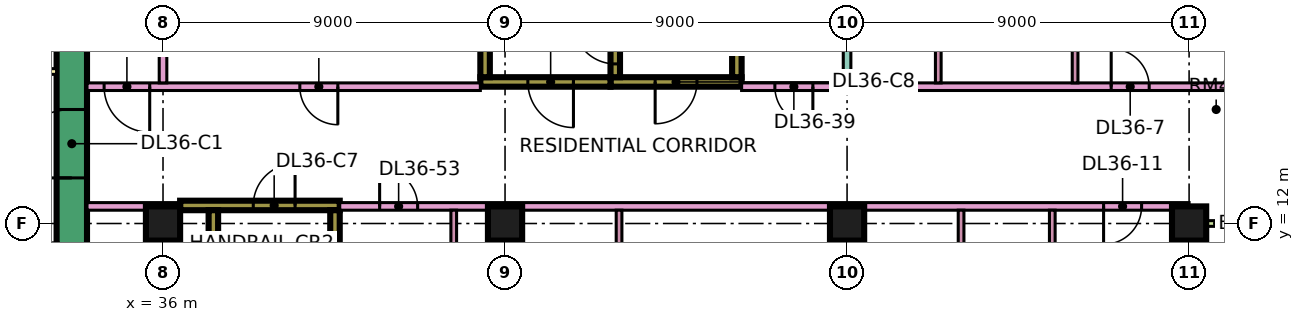
"""IFC4 building model, lengths in metres.
Left out: names, types, materials, properties, quantities, classifications, styles, units other than length and angle.
Written with IfcOpenShell. Run it as: python <this file> out.ifc"""

import sys

from ifc_helpers import new_model, si_unit, direction, frame, frame_2d, origin, origin_2d, place, context, subcontext, project, spatial, rectangle, extrude, element, fill, save


model = new_model("IFC4")
c1 = context("Model", 3, precision=1e-05, world=origin(), true_north=direction((0.0, 1.0)))
c2 = subcontext(c1, "Body", "Model", "MODEL_VIEW")
j1 = project(units=[si_unit("LENGTHUNIT", "METRE"), si_unit("PLANEANGLEUNIT", "RADIAN")], contexts=[c1])
p1 = place(None, origin())
s1 = spatial("IfcSite", under=j1, at=p1, CompositionType="ELEMENT")
p2 = place(p1, origin())
s2 = spatial("IfcBuilding", under=s1, at=p2, CompositionType="ELEMENT")
p3 = place(p2, frame((0.0, 0.0, 161.15)))
s3 = spatial("IfcBuildingStorey", under=s2, at=p3, CompositionType="ELEMENT", Elevation=161.15)
for number, where, z_axis, x_axis in (
    (1, (36.0, 12.0, 0.0), (0.0, 0.0, 1.0), (1.0, 0.0, 0.0)),
    (2, (45.0, 12.0, 0.0), (0.0, 0.0, 1.0), (1.0, 0.0, 0.0)),
    (3, (54.0, 12.0, 0.0), (0.0, 0.0, 1.0), (1.0, 0.0, 0.0)),
    (4, (63.0, 12.0, 0.0), (0.0, 0.0, 1.0), (1.0, 0.0, 0.0)),
):
    element("IfcColumn", number, at=place(p3, frame(where, z_axis=z_axis, x_axis=x_axis)), inside=s3, PredefinedType="COLUMN", context=c2, shape_type="SweptSolid", body=[
        extrude(rectangle(XDim=0.9, YDim=0.9, at=origin_2d()), origin(), (0.0, 0.0, 1.0), 3.75),
    ])
p4 = place(p3, frame((33.6, 7.8, 0.0), z_axis=(0.0, 0.0, 1.0), x_axis=(0.0, 1.0, 0.0)))
e5 = element("IfcWall", 5, at=p4, inside=s3, PredefinedType="SHEAR", context=c2, shape_type="SweptSolid", body=[
    extrude(rectangle(XDim=11.4, YDim=0.8, at=frame_2d((5.7, 0.0))), origin(), (0.0, 0.0, 1.0), 3.75),
])
p5 = place(p4, frame((5.4, 0.0, 0.0)))
e6 = element("IfcOpeningElement", 6, at=p5, cuts=e5, PredefinedType="OPENING", context=c2, shape_type="SweptSolid", body=[
    extrude(rectangle(XDim=1.8, YDim=2.4, at=frame_2d((0.9, 1.2))), frame((0.0, 0.41, 0.0), z_axis=(0.0, -1.0, 0.0), x_axis=(1.0, 0.0, 0.0)), (0.0, 0.0, 1.0), 0.82),
])
p6 = place(p3, frame((36.45, 12.475, 0.0), z_axis=(0.0, 0.0, 1.0), x_axis=(1.0, 0.0, 0.0)))
e7 = element("IfcWall", 7, at=p6, inside=s3, PredefinedType="SHEAR", context=c2, shape_type="SweptSolid", body=[
    extrude(rectangle(XDim=4.2, YDim=0.25, at=frame_2d((2.1, 0.0))), origin(), (0.0, 0.0, 1.0), 3.75),
])
p7 = place(p6, frame((1.925, 0.0, 0.0)))
e8 = element("IfcOpeningElement", 8, at=p7, cuts=e7, PredefinedType="OPENING", context=c2, shape_type="SweptSolid", body=[
    extrude(rectangle(XDim=1.1, YDim=2.2, at=frame_2d((0.55, 1.1))), frame((0.0, 0.135, 0.0), z_axis=(0.0, -1.0, 0.0), x_axis=(1.0, 0.0, 0.0)), (0.0, 0.0, 1.0), 0.27),
])
for number, where, z_axis, x_axis in (
    (9, (37.325, 5.85, 0.0), (0.0, 0.0, 1.0), (0.0, 1.0, 0.0)),
    (10, (40.525, 5.85, 0.0), (0.0, 0.0, 1.0), (0.0, 1.0, 0.0)),
):
    element("IfcWall", number, at=place(p3, frame(where, z_axis=z_axis, x_axis=x_axis)), inside=s3, PredefinedType="SHEAR", context=c2, shape_type="SweptSolid", body=[
        extrude(rectangle(XDim=6.5, YDim=0.25, at=frame_2d((3.25, 0.0))), origin(), (0.0, 0.0, 1.0), 3.75),
    ])
p8 = place(p3, frame((47.775, 15.725, 0.0), z_axis=(0.0, 0.0, 1.0), x_axis=(1.0, 0.0, 0.0)))
e11 = element("IfcWall", 11, at=p8, inside=s3, PredefinedType="SHEAR", context=c2, shape_type="SweptSolid", body=[
    extrude(rectangle(XDim=3.45, YDim=0.25, at=frame_2d((1.725, 0.0))), origin(), (0.0, 0.0, 1.0), 3.75),
])
p9 = place(p8, frame((1.175, 0.0, 0.0)))
e12 = element("IfcOpeningElement", 12, at=p9, cuts=e11, PredefinedType="OPENING", context=c2, shape_type="SweptSolid", body=[
    extrude(rectangle(XDim=1.1, YDim=2.2, at=frame_2d((0.55, 1.1))), frame((0.0, 0.135, 0.0), z_axis=(0.0, -1.0, 0.0), x_axis=(1.0, 0.0, 0.0)), (0.0, 0.0, 1.0), 0.27),
])
p10 = place(p3, frame((47.9, 15.85, 0.0), z_axis=(0.0, 0.0, 1.0), x_axis=(0.0, 1.0, 0.0)))
e13 = element("IfcWall", 13, at=p10, inside=s3, PredefinedType="SHEAR", context=c2, shape_type="SweptSolid", body=[
    extrude(rectangle(XDim=6.5, YDim=0.25, at=frame_2d((3.25, 0.0))), origin(), (0.0, 0.0, 1.0), 3.75),
])
p11 = place(p10, frame((0.35, 0.0, 0.0)))
e14 = element("IfcOpeningElement", 14, at=p11, cuts=e13, PredefinedType="OPENING", context=c2, shape_type="SweptSolid", body=[
    extrude(rectangle(XDim=1.1, YDim=2.2, at=frame_2d((0.55, 1.1))), frame((0.0, 0.135, 0.0), z_axis=(0.0, -1.0, 0.0), x_axis=(1.0, 0.0, 0.0)), (0.0, 0.0, 1.0), 0.27),
])
p12 = place(p3, frame((51.1, 15.85, 0.0), z_axis=(0.0, 0.0, 1.0), x_axis=(0.0, 1.0, 0.0)))
e15 = element("IfcWall", 15, at=p12, inside=s3, PredefinedType="SHEAR", context=c2, shape_type="SweptSolid", body=[
    extrude(rectangle(XDim=6.5, YDim=0.25, at=frame_2d((3.25, 0.0))), origin(), (0.0, 0.0, 1.0), 3.75),
])
p13 = place(p3, frame((44.35, 15.725, 0.0), z_axis=(0.0, 0.0, 1.0), x_axis=(1.0, 0.0, 0.0)))
e16 = element("IfcWall", 16, at=p13, inside=s3, PredefinedType="SHEAR", context=c2, shape_type="SweptSolid", body=[
    extrude(rectangle(XDim=3.425, YDim=0.25, at=frame_2d((1.712, 0.0))), origin(), (0.0, 0.0, 1.0), 3.75),
])
p14 = place(p13, frame((1.25, 0.0, 0.0)))
e17 = element("IfcOpeningElement", 17, at=p14, cuts=e16, PredefinedType="OPENING", context=c2, shape_type="SweptSolid", body=[
    extrude(rectangle(XDim=1.2, YDim=2.2, at=frame_2d((0.6, 1.1))), frame((0.0, 0.135, 0.0), z_axis=(0.0, -1.0, 0.0), x_axis=(1.0, 0.0, 0.0)), (0.0, 0.0, 1.0), 0.27),
])
p15 = place(p3, frame((44.475, 15.85, 0.0), z_axis=(0.0, 0.0, 1.0), x_axis=(0.0, 1.0, 0.0)))
e18 = element("IfcWall", 18, at=p15, inside=s3, PredefinedType="SHEAR", context=c2, shape_type="SweptSolid", body=[
    extrude(rectangle(XDim=6.5, YDim=0.25, at=frame_2d((3.25, 0.0))), origin(), (0.0, 0.0, 1.0), 3.75),
])
p16 = place(p15, frame((1.75, 0.0, 0.0)))
e19 = element("IfcOpeningElement", 19, at=p16, cuts=e18, PredefinedType="OPENING", context=c2, shape_type="SweptSolid", body=[
    extrude(rectangle(XDim=1.1, YDim=2.2, at=frame_2d((0.55, 1.1))), frame((0.0, 0.135, 0.0), z_axis=(0.0, -1.0, 0.0), x_axis=(1.0, 0.0, 0.0)), (0.0, 0.0, 1.0), 0.27),
])
p17 = place(p15, frame((4.3, 0.0, 0.0)))
e20 = element("IfcOpeningElement", 20, at=p17, cuts=e18, PredefinedType="OPENING", context=c2, shape_type="SweptSolid", body=[
    extrude(rectangle(XDim=1.1, YDim=2.2, at=frame_2d((0.55, 1.1))), frame((0.0, 0.135, 0.0), z_axis=(0.0, -1.0, 0.0), x_axis=(1.0, 0.0, 0.0)), (0.0, 0.0, 1.0), 0.27),
])
p18 = place(p3, frame((63.0, 1.575, 0.0), z_axis=(0.0, 0.0, 1.0), x_axis=(0.0, 1.0, 0.0)))
e21 = element("IfcWall", 21, at=p18, inside=s3, PredefinedType="SOLIDWALL", context=c2, shape_type="SweptSolid", body=[
    extrude(rectangle(XDim=10.35, YDim=0.15, at=frame_2d((5.175, 0.0))), origin(), (0.0, 0.0, 1.0), 3.35),
])
p19 = place(p18, frame((4.038, 0.0, 0.0)))
e22 = element("IfcOpeningElement", 22, at=p19, cuts=e21, PredefinedType="OPENING", context=c2, shape_type="SweptSolid", body=[
    extrude(rectangle(XDim=1.8, YDim=2.4, at=frame_2d((0.9, 1.2))), frame((0.0, 0.085, 0.0), z_axis=(0.0, -1.0, 0.0), x_axis=(1.0, 0.0, 0.0)), (0.0, 0.0, 1.0), 0.17),
])
p20 = place(p3, frame((64.5, 12.0, 0.0), z_axis=(0.0, 0.0, 1.0), x_axis=(-1.0, 0.0, 0.0)))
e23 = element("IfcWall", 23, at=p20, inside=s3, PredefinedType="SOLIDWALL", context=c2, shape_type="SweptSolid", body=[
    extrude(rectangle(XDim=1.5, YDim=0.15, at=frame_2d((0.75, 0.0))), origin(), (0.0, 0.0, 1.0), 3.35),
])
p21 = place(p3, frame((31.2, 16.0, 0.0), z_axis=(0.0, 0.0, 1.0), x_axis=(1.0, 0.0, 0.0)))
e24 = element("IfcWall", 24, at=p21, inside=s3, PredefinedType="PARTITIONING", context=c2, shape_type="SweptSolid", body=[
    extrude(rectangle(XDim=2.0, YDim=0.15, at=frame_2d((1.0, 0.0))), origin(), (0.0, 0.0, 1.0), 3.35),
])
p22 = place(p3, frame((34.0, 12.45, 0.0), z_axis=(0.0, 0.0, 1.0), x_axis=(1.0, 0.0, 0.0)))
e25 = element("IfcWall", 25, at=p22, inside=s3, PredefinedType="PARTITIONING", context=c2, shape_type="SweptSolid", body=[
    extrude(rectangle(XDim=2.451, YDim=0.2, at=frame_2d((1.226, 0.0))), origin(), (0.0, 0.0, 1.0), 3.35),
])
p23 = place(p3, frame((34.0, 15.6, 0.0), z_axis=(0.0, 0.0, 1.0), x_axis=(1.0, 0.0, 0.0)))
e26 = element("IfcWall", 26, at=p23, inside=s3, PredefinedType="PARTITIONING", context=c2, shape_type="SweptSolid", body=[
    extrude(rectangle(XDim=10.35, YDim=0.2, at=frame_2d((5.175, 0.0))), origin(), (0.0, 0.0, 1.0), 3.35),
])
p24 = place(p23, frame((5.6, 0.0, 0.0)))
e27 = element("IfcOpeningElement", 27, at=p24, cuts=e26, PredefinedType="OPENING", context=c2, shape_type="SweptSolid", body=[
    extrude(rectangle(XDim=1.0, YDim=2.1, at=frame_2d((0.5, 1.05))), frame((0.0, 0.11, 0.0), z_axis=(0.0, -1.0, 0.0), x_axis=(1.0, 0.0, 0.0)), (0.0, 0.0, 1.0), 0.22),
])
p25 = place(p23, frame((0.45, 0.0, 0.0)))
e28 = element("IfcOpeningElement", 28, at=p25, cuts=e26, PredefinedType="OPENING", context=c2, shape_type="SweptSolid", body=[
    extrude(rectangle(XDim=1.2, YDim=2.1, at=frame_2d((0.6, 1.05))), frame((0.0, 0.11, 0.0), z_axis=(0.0, -1.0, 0.0), x_axis=(1.0, 0.0, 0.0)), (0.0, 0.0, 1.0), 0.22),
])
p26 = place(p3, frame((36.0, 15.7, 0.0), z_axis=(0.0, 0.0, 1.0), x_axis=(0.0, 1.0, 0.0)))
e29 = element("IfcWall", 29, at=p26, inside=s3, PredefinedType="PARTITIONING", context=c2, shape_type="SweptSolid", body=[
    extrude(rectangle(XDim=8.3, YDim=0.2, at=frame_2d((4.15, 0.0))), origin(), (0.0, 0.0, 1.0), 3.35),
])
p27 = place(p3, frame((40.65, 12.45, 0.0), z_axis=(0.0, 0.0, 1.0), x_axis=(1.0, 0.0, 0.0)))
e30 = element("IfcWall", 30, at=p27, inside=s3, PredefinedType="PARTITIONING", context=c2, shape_type="SweptSolid", body=[
    extrude(rectangle(XDim=22.35, YDim=0.2, at=frame_2d((11.175, 0.0))), origin(), (0.0, 0.0, 1.0), 3.35),
])
p28 = place(p27, frame((20.1, 0.0, 0.0)))
e31 = element("IfcOpeningElement", 31, at=p28, cuts=e30, PredefinedType="OPENING", context=c2, shape_type="SweptSolid", body=[
    extrude(rectangle(XDim=1.0, YDim=2.1, at=frame_2d((0.5, 1.05))), frame((0.0, 0.11, 0.0), z_axis=(0.0, -1.0, 0.0), x_axis=(1.0, 0.0, 0.0)), (0.0, 0.0, 1.0), 0.22),
])
p29 = place(p27, frame((1.05, 0.0, 0.0)))
e32 = element("IfcOpeningElement", 32, at=p29, cuts=e30, PredefinedType="OPENING", context=c2, shape_type="SweptSolid", body=[
    extrude(rectangle(XDim=1.0, YDim=2.1, at=frame_2d((0.5, 1.05))), frame((0.0, 0.11, 0.0), z_axis=(0.0, -1.0, 0.0), x_axis=(1.0, 0.0, 0.0)), (0.0, 0.0, 1.0), 0.22),
])
p30 = place(p3, frame((43.65, 5.975, 0.0), z_axis=(0.0, 0.0, 1.0), x_axis=(0.0, 1.0, 0.0)))
e33 = element("IfcWall", 33, at=p30, inside=s3, PredefinedType="PARTITIONING", context=c2, shape_type="SweptSolid", body=[
    extrude(rectangle(XDim=6.375, YDim=0.15, at=frame_2d((3.188, 0.0))), origin(), (0.0, 0.0, 1.0), 3.35),
])
p31 = place(p30, frame((4.275, 0.0, 0.0)))
e34 = element("IfcOpeningElement", 34, at=p31, cuts=e33, PredefinedType="OPENING", context=c2, shape_type="SweptSolid", body=[
    extrude(rectangle(XDim=0.9, YDim=2.1, at=frame_2d((0.45, 1.05))), frame((0.0, 0.085, 0.0), z_axis=(0.0, -1.0, 0.0), x_axis=(1.0, 0.0, 0.0)), (0.0, 0.0, 1.0), 0.17),
])
p32 = place(p3, frame((48.0, 5.975, 0.0), z_axis=(0.0, 0.0, 1.0), x_axis=(0.0, 1.0, 0.0)))
e35 = element("IfcWall", 35, at=p32, inside=s3, PredefinedType="PARTITIONING", context=c2, shape_type="SweptSolid", body=[
    extrude(rectangle(XDim=6.375, YDim=0.15, at=frame_2d((3.188, 0.0))), origin(), (0.0, 0.0, 1.0), 3.35),
])
p33 = place(p3, frame((51.225, 15.6, 0.0), z_axis=(0.0, 0.0, 1.0), x_axis=(1.0, 0.0, 0.0)))
e36 = element("IfcWall", 36, at=p33, inside=s3, PredefinedType="PARTITIONING", context=c2, shape_type="SweptSolid", body=[
    extrude(rectangle(XDim=13.125, YDim=0.2, at=frame_2d((6.562, 0.0))), origin(), (0.0, 0.0, 1.0), 3.35),
])
p34 = place(p33, frame((9.725, 0.0, 0.0)))
e37 = element("IfcOpeningElement", 37, at=p34, cuts=e36, PredefinedType="OPENING", context=c2, shape_type="SweptSolid", body=[
    extrude(rectangle(XDim=1.0, YDim=2.1, at=frame_2d((0.5, 1.05))), frame((0.0, 0.11, 0.0), z_axis=(0.0, -1.0, 0.0), x_axis=(1.0, 0.0, 0.0)), (0.0, 0.0, 1.0), 0.22),
])
p35 = place(p33, frame((0.875, 0.0, 0.0)))
e38 = element("IfcOpeningElement", 38, at=p35, cuts=e36, PredefinedType="OPENING", context=c2, shape_type="SweptSolid", body=[
    extrude(rectangle(XDim=1.0, YDim=2.1, at=frame_2d((0.5, 1.05))), frame((0.0, 0.11, 0.0), z_axis=(0.0, -1.0, 0.0), x_axis=(1.0, 0.0, 0.0)), (0.0, 0.0, 1.0), 0.22),
])
p36 = place(p3, frame((54.0, 0.074, 0.0), z_axis=(0.0, 0.0, 1.0), x_axis=(0.0, 1.0, 0.0)))
e39 = element("IfcWall", 39, at=p36, inside=s3, PredefinedType="PARTITIONING", context=c2, shape_type="SweptSolid", body=[
    extrude(rectangle(XDim=12.276, YDim=0.2, at=frame_2d((6.138, 0.0))), origin(), (0.0, 0.0, 1.0), 3.35),
])
p37 = place(p3, frame((54.0, 15.7, 0.0), z_axis=(0.0, 0.0, 1.0), x_axis=(0.0, 1.0, 0.0)))
e40 = element("IfcWall", 40, at=p37, inside=s3, PredefinedType="PARTITIONING", context=c2, shape_type="SweptSolid", body=[
    extrude(rectangle(XDim=8.226, YDim=0.2, at=frame_2d((4.113, 0.0))), origin(), (0.0, 0.0, 1.0), 3.35),
])
p38 = place(p3, frame((56.4, 15.7, 0.0), z_axis=(0.0, 0.0, 1.0), x_axis=(0.0, 1.0, 0.0)))
e41 = element("IfcWall", 41, at=p38, inside=s3, PredefinedType="PARTITIONING", context=c2, shape_type="SweptSolid", body=[
    extrude(rectangle(XDim=2.825, YDim=0.15, at=frame_2d((1.413, 0.0))), origin(), (0.0, 0.0, 1.0), 3.35),
])
for number, where, z_axis, x_axis in (
    (42, (57.0, 7.725, 0.0), (0.0, 0.0, 1.0), (0.0, 1.0, 0.0)),
    (43, (59.4, 7.725, 0.0), (0.0, 0.0, 1.0), (0.0, 1.0, 0.0)),
):
    element("IfcWall", number, at=place(p3, frame(where, z_axis=z_axis, x_axis=x_axis)), inside=s3, PredefinedType="PARTITIONING", context=c2, shape_type="SweptSolid", body=[
        extrude(rectangle(XDim=4.625, YDim=0.15, at=frame_2d((2.312, 0.0))), origin(), (0.0, 0.0, 1.0), 3.35),
    ])
p39 = place(p3, frame((60.0, 15.7, 0.0), z_axis=(0.0, 0.0, 1.0), x_axis=(0.0, 1.0, 0.0)))
e44 = element("IfcWall", 44, at=p39, inside=s3, PredefinedType="PARTITIONING", context=c2, shape_type="SweptSolid", body=[
    extrude(rectangle(XDim=2.825, YDim=0.15, at=frame_2d((1.413, 0.0))), origin(), (0.0, 0.0, 1.0), 3.35),
])
p40 = place(p5, origin())
e45 = element("IfcDoor", 45, at=p40, inside=s3, OperationType="DOUBLE_DOOR_SINGLE_SWING", PredefinedType="DOOR", context=c2, shape_type="SweptSolid", body=[
    extrude(rectangle(XDim=1.8, YDim=2.4, at=frame_2d((0.9, 1.2))), frame((0.0, 0.025, 0.0), z_axis=(0.0, -1.0, 0.0), x_axis=(1.0, 0.0, 0.0)), (0.0, 0.0, 1.0), 0.05),
])
fill(e6, e45)
p41 = place(p7, frame((1.1, 0.0, 0.0), z_axis=(0.0, 0.0, 1.0), x_axis=(-1.0, 0.0, 0.0)))
e46 = element("IfcDoor", 46, at=p41, inside=s3, OperationType="SINGLE_SWING_RIGHT", PredefinedType="DOOR", context=c2, shape_type="SweptSolid", body=[
    extrude(rectangle(XDim=1.1, YDim=2.2, at=frame_2d((0.55, 1.1))), frame((0.0, 0.025, 0.0), z_axis=(0.0, -1.0, 0.0), x_axis=(1.0, 0.0, 0.0)), (0.0, 0.0, 1.0), 0.05),
])
fill(e8, e46)
p42 = place(p9, frame((1.1, 0.0, 0.0), z_axis=(0.0, 0.0, 1.0), x_axis=(-1.0, 0.0, 0.0)))
e47 = element("IfcDoor", 47, at=p42, inside=s3, OperationType="SINGLE_SWING_LEFT", PredefinedType="DOOR", context=c2, shape_type="SweptSolid", body=[
    extrude(rectangle(XDim=1.1, YDim=2.2, at=frame_2d((0.55, 1.1))), frame((0.0, 0.025, 0.0), z_axis=(0.0, -1.0, 0.0), x_axis=(1.0, 0.0, 0.0)), (0.0, 0.0, 1.0), 0.05),
])
fill(e12, e47)
p43 = place(p14, origin())
e48 = element("IfcDoor", 48, at=p43, inside=s3, OperationType="SINGLE_SWING_RIGHT", PredefinedType="DOOR", context=c2, shape_type="SweptSolid", body=[
    extrude(rectangle(XDim=1.2, YDim=2.2, at=frame_2d((0.6, 1.1))), frame((0.0, 0.025, 0.0), z_axis=(0.0, -1.0, 0.0), x_axis=(1.0, 0.0, 0.0)), (0.0, 0.0, 1.0), 0.05),
])
fill(e17, e48)
p44 = place(p11, frame((1.1, 0.0, 0.0), z_axis=(0.0, 0.0, 1.0), x_axis=(-1.0, 0.0, 0.0)))
e49 = element("IfcDoor", 49, at=p44, inside=s3, OperationType="SINGLE_SWING_RIGHT", PredefinedType="DOOR", context=c2, shape_type="SweptSolid", body=[
    extrude(rectangle(XDim=1.1, YDim=2.2, at=frame_2d((0.55, 1.1))), frame((0.0, 0.025, 0.0), z_axis=(0.0, -1.0, 0.0), x_axis=(1.0, 0.0, 0.0)), (0.0, 0.0, 1.0), 0.05),
])
fill(e14, e49)
p45 = place(p24, origin())
e50 = element("IfcDoor", 50, at=p45, inside=s3, OperationType="SINGLE_SWING_RIGHT", PredefinedType="DOOR", context=c2, shape_type="SweptSolid", body=[
    extrude(rectangle(XDim=1.0, YDim=2.1, at=frame_2d((0.5, 1.05))), frame((0.0, 0.025, 0.0), z_axis=(0.0, -1.0, 0.0), x_axis=(1.0, 0.0, 0.0)), (0.0, 0.0, 1.0), 0.05),
])
fill(e27, e50)
p46 = place(p34, origin())
e51 = element("IfcDoor", 51, at=p46, inside=s3, OperationType="SINGLE_SWING_LEFT", PredefinedType="DOOR", context=c2, shape_type="SweptSolid", body=[
    extrude(rectangle(XDim=1.0, YDim=2.1, at=frame_2d((0.5, 1.05))), frame((0.0, 0.025, 0.0), z_axis=(0.0, -1.0, 0.0), x_axis=(1.0, 0.0, 0.0)), (0.0, 0.0, 1.0), 0.05),
])
fill(e37, e51)
p47 = place(p28, frame((1.0, 0.0, 0.0), z_axis=(0.0, 0.0, 1.0), x_axis=(-1.0, 0.0, 0.0)))
e52 = element("IfcDoor", 52, at=p47, inside=s3, OperationType="SINGLE_SWING_LEFT", PredefinedType="DOOR", context=c2, shape_type="SweptSolid", body=[
    extrude(rectangle(XDim=1.0, YDim=2.1, at=frame_2d((0.5, 1.05))), frame((0.0, 0.025, 0.0), z_axis=(0.0, -1.0, 0.0), x_axis=(1.0, 0.0, 0.0)), (0.0, 0.0, 1.0), 0.05),
])
fill(e31, e52)
p48 = place(p25, origin())
e53 = element("IfcDoor", 53, at=p48, inside=s3, OperationType="SINGLE_SWING_RIGHT", PredefinedType="DOOR", context=c2, shape_type="SweptSolid", body=[
    extrude(rectangle(XDim=1.2, YDim=2.1, at=frame_2d((0.6, 1.05))), frame((0.0, 0.025, 0.0), z_axis=(0.0, -1.0, 0.0), x_axis=(1.0, 0.0, 0.0)), (0.0, 0.0, 1.0), 0.05),
])
fill(e28, e53)
p49 = place(p35, origin())
e54 = element("IfcDoor", 54, at=p49, inside=s3, OperationType="SINGLE_SWING_RIGHT", PredefinedType="DOOR", context=c2, shape_type="SweptSolid", body=[
    extrude(rectangle(XDim=1.0, YDim=2.1, at=frame_2d((0.5, 1.05))), frame((0.0, 0.025, 0.0), z_axis=(0.0, -1.0, 0.0), x_axis=(1.0, 0.0, 0.0)), (0.0, 0.0, 1.0), 0.05),
])
fill(e38, e54)
p50 = place(p29, origin())
e55 = element("IfcDoor", 55, at=p50, inside=s3, OperationType="SINGLE_SWING_LEFT", PredefinedType="DOOR", context=c2, shape_type="SweptSolid", body=[
    extrude(rectangle(XDim=1.0, YDim=2.1, at=frame_2d((0.5, 1.05))), frame((0.0, 0.025, 0.0), z_axis=(0.0, -1.0, 0.0), x_axis=(1.0, 0.0, 0.0)), (0.0, 0.0, 1.0), 0.05),
])
fill(e32, e55)
save(model, sys.argv[1])
